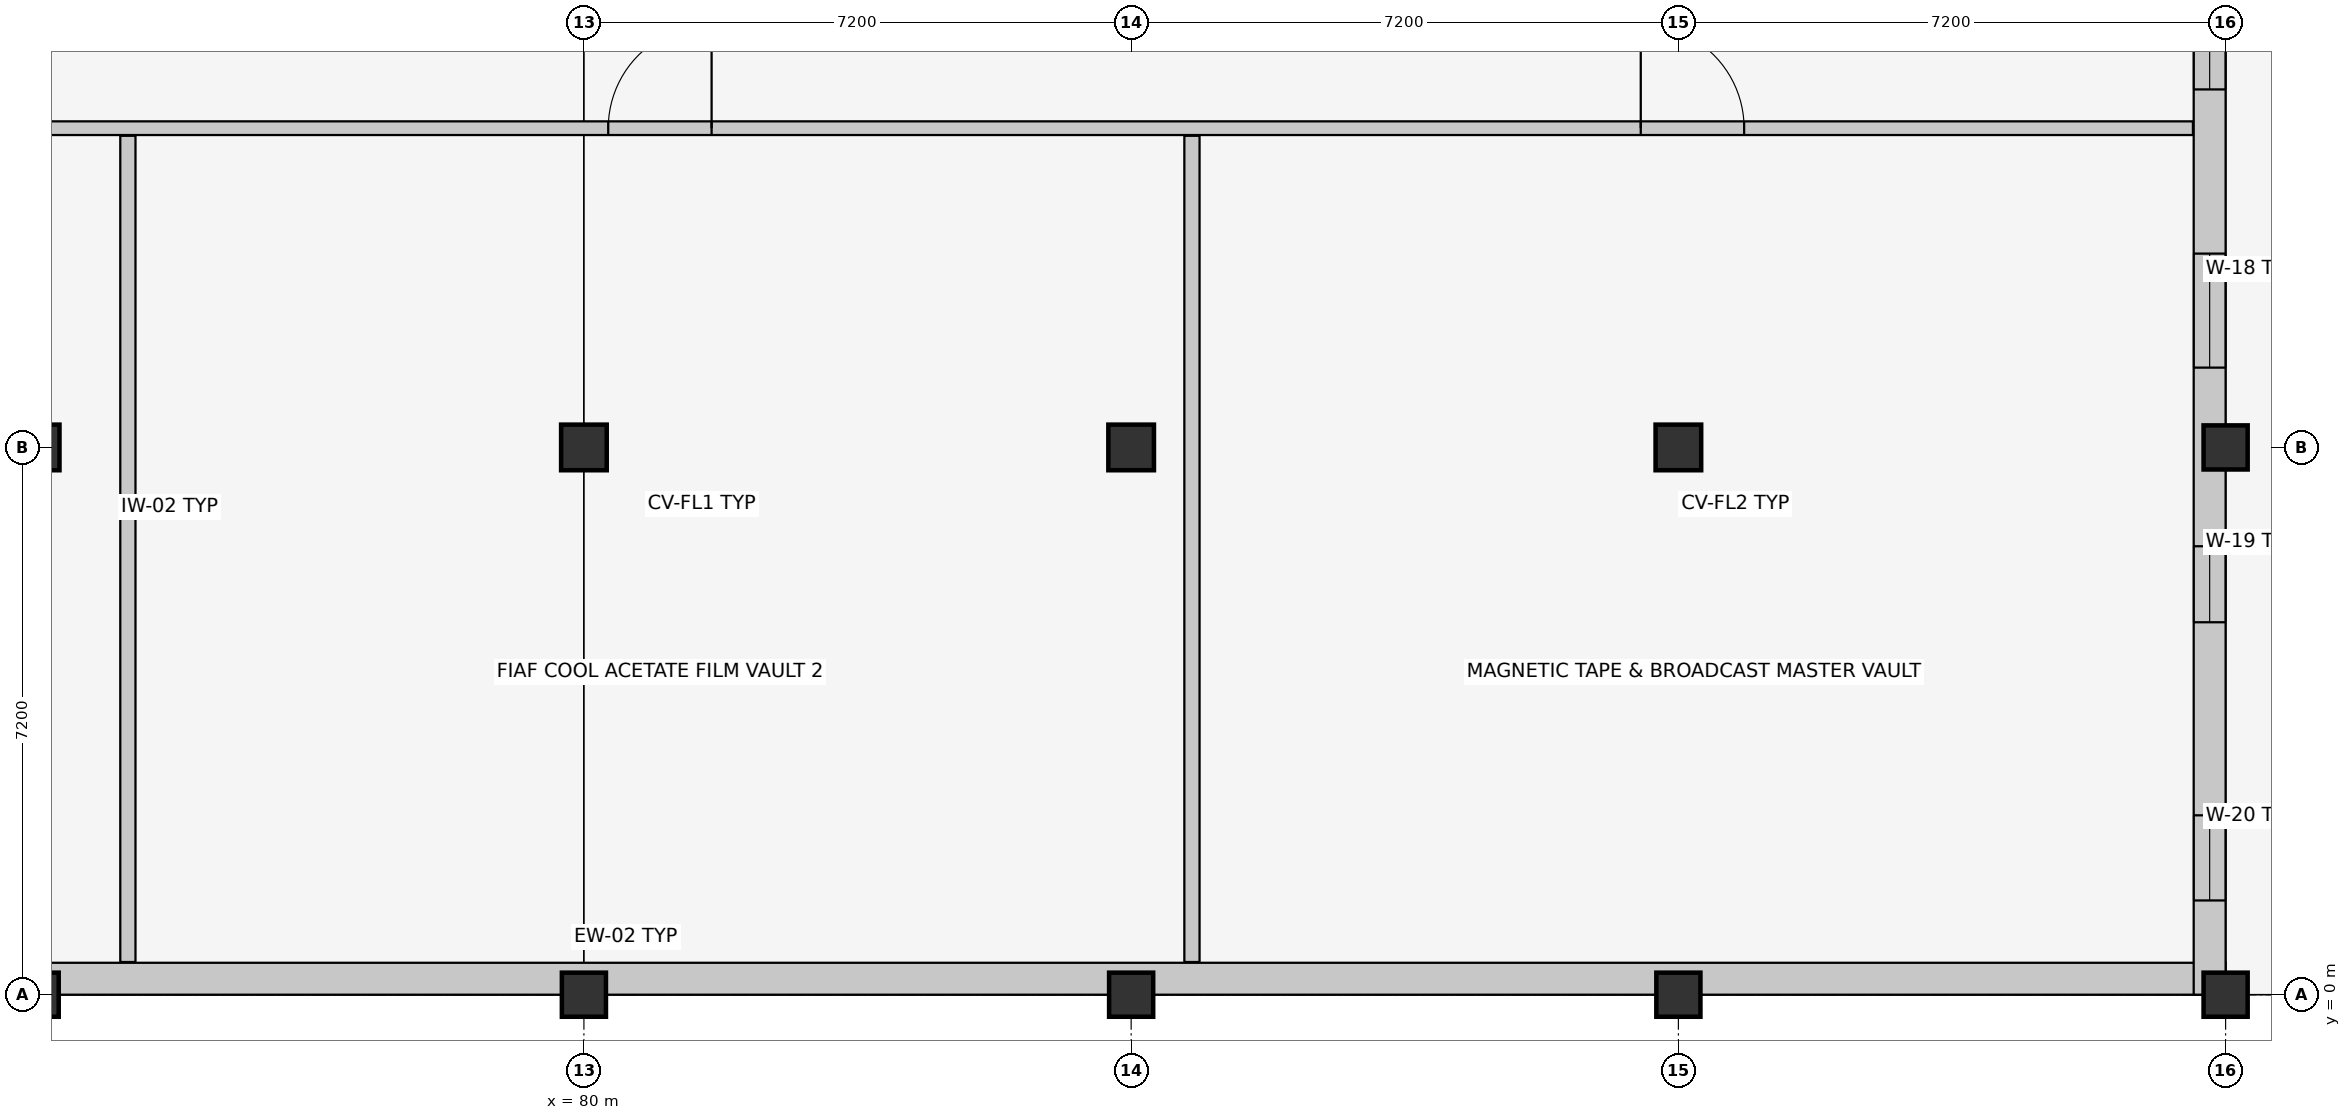
"""IFC4 building model, lengths in metres.
Left out: names, types, materials, properties, quantities, classifications, styles, units other than length and angle.
Written with IfcOpenShell. Run it as: python <this file> out.ifc"""

import sys

from ifc_helpers import new_model, si_unit, direction, frame, frame_2d, origin, origin_2d, place, context, subcontext, project, spatial, rectangle, extrude, element, fill, save


model = new_model("IFC4")
c1 = context("Model", 3, precision=1e-05, world=origin(), true_north=direction((0.0, 1.0)))
c2 = subcontext(c1, "Body", "Model", "MODEL_VIEW")
j1 = project(units=[si_unit("LENGTHUNIT", "METRE"), si_unit("PLANEANGLEUNIT", "RADIAN")], contexts=[c1])
p1 = place(None, origin())
s1 = spatial("IfcSite", under=j1, at=p1, CompositionType="ELEMENT")
p2 = place(p1, origin())
s2 = spatial("IfcBuilding", under=s1, at=p2, CompositionType="ELEMENT")
p3 = place(p2, frame((0.0, 0.0, 9.6)))
s3 = spatial("IfcBuildingStorey", under=s2, at=p3, CompositionType="ELEMENT", Elevation=9.6)
p4 = place(p3, frame((72.8, 0.0, 0.0), z_axis=(0.0, 0.0, 1.0), x_axis=(1.0, 0.0, 0.0)))
e1 = element("IfcColumn", 1, at=p4, inside=s3, PredefinedType="COLUMN", context=c2, shape_type="SweptSolid", body=[
    extrude(rectangle(XDim=0.58, YDim=0.58, at=origin_2d()), origin(), (0.0, 0.0, 1.0), 4.2),
])
p5 = place(p3, frame((72.8, 7.2, 0.0), z_axis=(0.0, 0.0, 1.0), x_axis=(1.0, 0.0, 0.0)))
e2 = element("IfcColumn", 2, at=p5, inside=s3, PredefinedType="COLUMN", context=c2, shape_type="SweptSolid", body=[
    extrude(rectangle(XDim=0.6, YDim=0.6, at=origin_2d()), origin(), (0.0, 0.0, 1.0), 4.2),
])
p6 = place(p3, frame((80.0, 0.0, 0.0), z_axis=(0.0, 0.0, 1.0), x_axis=(1.0, 0.0, 0.0)))
e3 = element("IfcColumn", 3, at=p6, inside=s3, PredefinedType="COLUMN", context=c2, shape_type="SweptSolid", body=[
    extrude(rectangle(XDim=0.58, YDim=0.58, at=origin_2d()), origin(), (0.0, 0.0, 1.0), 4.2),
])
p7 = place(p3, frame((80.0, 7.2, 0.0), z_axis=(0.0, 0.0, 1.0), x_axis=(1.0, 0.0, 0.0)))
e4 = element("IfcColumn", 4, at=p7, inside=s3, PredefinedType="COLUMN", context=c2, shape_type="SweptSolid", body=[
    extrude(rectangle(XDim=0.6, YDim=0.6, at=origin_2d()), origin(), (0.0, 0.0, 1.0), 4.2),
])
p8 = place(p3, frame((87.2, 0.0, 0.0), z_axis=(0.0, 0.0, 1.0), x_axis=(1.0, 0.0, 0.0)))
e5 = element("IfcColumn", 5, at=p8, inside=s3, PredefinedType="COLUMN", context=c2, shape_type="SweptSolid", body=[
    extrude(rectangle(XDim=0.58, YDim=0.58, at=origin_2d()), origin(), (0.0, 0.0, 1.0), 4.2),
])
p9 = place(p3, frame((87.2, 7.2, 0.0), z_axis=(0.0, 0.0, 1.0), x_axis=(1.0, 0.0, 0.0)))
e6 = element("IfcColumn", 6, at=p9, inside=s3, PredefinedType="COLUMN", context=c2, shape_type="SweptSolid", body=[
    extrude(rectangle(XDim=0.6, YDim=0.6, at=origin_2d()), origin(), (0.0, 0.0, 1.0), 4.2),
])
p10 = place(p3, frame((94.4, 0.0, 0.0), z_axis=(0.0, 0.0, 1.0), x_axis=(1.0, 0.0, 0.0)))
e7 = element("IfcColumn", 7, at=p10, inside=s3, PredefinedType="COLUMN", context=c2, shape_type="SweptSolid", body=[
    extrude(rectangle(XDim=0.58, YDim=0.58, at=origin_2d()), origin(), (0.0, 0.0, 1.0), 4.2),
])
p11 = place(p3, frame((94.4, 7.2, 0.0), z_axis=(0.0, 0.0, 1.0), x_axis=(1.0, 0.0, 0.0)))
e8 = element("IfcColumn", 8, at=p11, inside=s3, PredefinedType="COLUMN", context=c2, shape_type="SweptSolid", body=[
    extrude(rectangle(XDim=0.6, YDim=0.6, at=origin_2d()), origin(), (0.0, 0.0, 1.0), 4.2),
])
for number, where, z_axis, x_axis in (
    (9, (101.6, 0.0, 0.0), (0.0, 0.0, 1.0), (1.0, 0.0, 0.0)),
    (10, (101.6, 7.2, 0.0), (0.0, 0.0, 1.0), (1.0, 0.0, 0.0)),
):
    element("IfcColumn", number, at=place(p3, frame(where, z_axis=z_axis, x_axis=x_axis)), inside=s3, PredefinedType="COLUMN", context=c2, shape_type="SweptSolid", body=[
        extrude(rectangle(XDim=0.58, YDim=0.58, at=origin_2d()), origin(), (0.0, 0.0, 1.0), 4.2),
    ])
p12 = place(p3, frame((101.6, 0.21, 0.0), z_axis=(0.0, 0.0, 1.0), x_axis=(-1.0, 0.0, 0.0)))
e11 = element("IfcWall", 11, at=p12, inside=s3, PredefinedType="SOLIDWALL", context=c2, shape_type="SweptSolid", body=[
    extrude(rectangle(XDim=43.2, YDim=0.42, at=frame_2d((21.6, 0.0))), origin(), (0.0, 0.0, 1.0), 3.255),
])
p13 = place(p3, frame((101.39, 21.6, 0.0), z_axis=(0.0, 0.0, 1.0), x_axis=(0.0, -1.0, 0.0)))
e12 = element("IfcWall", 12, at=p13, inside=s3, PredefinedType="SOLIDWALL", context=c2, shape_type="SweptSolid", body=[
    extrude(rectangle(XDim=21.6, YDim=0.42, at=frame_2d((10.8, 0.0))), origin(), (0.0, 0.0, 1.0), 3.355),
])
p14 = place(p13, frame((1.225, 0.0, 0.9)))
e13 = element("IfcOpeningElement", 13, at=p14, cuts=e12, PredefinedType="OPENING", context=c2, shape_type="SweptSolid", body=[
    extrude(rectangle(XDim=1.15, YDim=1.6, at=frame_2d((0.575, 0.8))), frame((0.0, 0.222, 0.0), z_axis=(0.0, -1.0, 0.0), x_axis=(1.0, 0.0, 0.0)), (0.0, 0.0, 1.0), 0.444),
])
p15 = place(p13, frame((4.775, 0.0, 0.9)))
e14 = element("IfcOpeningElement", 14, at=p15, cuts=e12, PredefinedType="OPENING", context=c2, shape_type="SweptSolid", body=[
    extrude(rectangle(XDim=1.25, YDim=1.6, at=frame_2d((0.625, 0.8))), frame((0.0, 0.222, 0.0), z_axis=(0.0, -1.0, 0.0), x_axis=(1.0, 0.0, 0.0)), (0.0, 0.0, 1.0), 0.444),
])
p16 = place(p13, frame((8.31, 0.0, 0.9)))
e15 = element("IfcOpeningElement", 15, at=p16, cuts=e12, PredefinedType="OPENING", context=c2, shape_type="SweptSolid", body=[
    extrude(rectangle(XDim=1.38, YDim=1.6, at=frame_2d((0.69, 0.8))), frame((0.0, 0.222, 0.0), z_axis=(0.0, -1.0, 0.0), x_axis=(1.0, 0.0, 0.0)), (0.0, 0.0, 1.0), 0.444),
])
p17 = place(p13, frame((11.85, 0.0, 0.9)))
e16 = element("IfcOpeningElement", 16, at=p17, cuts=e12, PredefinedType="OPENING", context=c2, shape_type="SweptSolid", body=[
    extrude(rectangle(XDim=1.5, YDim=1.6, at=frame_2d((0.75, 0.8))), frame((0.0, 0.222, 0.0), z_axis=(0.0, -1.0, 0.0), x_axis=(1.0, 0.0, 0.0)), (0.0, 0.0, 1.0), 0.444),
])
p18 = place(p13, frame((15.7, 0.0, 0.9)))
e17 = element("IfcOpeningElement", 17, at=p18, cuts=e12, PredefinedType="OPENING", context=c2, shape_type="SweptSolid", body=[
    extrude(rectangle(XDim=1.0, YDim=1.75, at=frame_2d((0.5, 0.875))), frame((0.0, 0.222, 0.0), z_axis=(0.0, -1.0, 0.0), x_axis=(1.0, 0.0, 0.0)), (0.0, 0.0, 1.0), 0.444),
])
p19 = place(p13, frame((19.24, 0.0, 0.9)))
e18 = element("IfcOpeningElement", 18, at=p19, cuts=e12, PredefinedType="OPENING", context=c2, shape_type="SweptSolid", body=[
    extrude(rectangle(XDim=1.12, YDim=1.75, at=frame_2d((0.56, 0.875))), frame((0.0, 0.222, 0.0), z_axis=(0.0, -1.0, 0.0), x_axis=(1.0, 0.0, 0.0)), (0.0, 0.0, 1.0), 0.444),
])
p20 = place(p3, frame((58.83, 11.4, 0.0), z_axis=(0.0, 0.0, 1.0), x_axis=(1.0, 0.0, 0.0)))
e19 = element("IfcWall", 19, at=p20, inside=s3, PredefinedType="PARTITIONING", context=c2, shape_type="SweptSolid", body=[
    extrude(rectangle(XDim=42.34, YDim=0.18, at=frame_2d((21.17, 0.0))), origin(), (0.0, 0.0, 1.0), 3.96),
])
p21 = place(p20, frame((6.905, 0.0, 0.0)))
e20 = element("IfcOpeningElement", 20, at=p21, cuts=e19, PredefinedType="OPENING", context=c2, shape_type="SweptSolid", body=[
    extrude(rectangle(XDim=1.36, YDim=2.2, at=frame_2d((0.68, 1.1))), frame((0.0, 0.102, 0.0), z_axis=(0.0, -1.0, 0.0), x_axis=(1.0, 0.0, 0.0)), (0.0, 0.0, 1.0), 0.204),
])
p22 = place(p20, frame((21.49, 0.0, 0.0)))
e21 = element("IfcOpeningElement", 21, at=p22, cuts=e19, PredefinedType="OPENING", context=c2, shape_type="SweptSolid", body=[
    extrude(rectangle(XDim=1.36, YDim=2.2, at=frame_2d((0.68, 1.1))), frame((0.0, 0.102, 0.0), z_axis=(0.0, -1.0, 0.0), x_axis=(1.0, 0.0, 0.0)), (0.0, 0.0, 1.0), 0.204),
])
p23 = place(p20, frame((35.075, 0.0, 0.0)))
e22 = element("IfcOpeningElement", 22, at=p23, cuts=e19, PredefinedType="OPENING", context=c2, shape_type="SweptSolid", body=[
    extrude(rectangle(XDim=1.36, YDim=2.2, at=frame_2d((0.68, 1.1))), frame((0.0, 0.102, 0.0), z_axis=(0.0, -1.0, 0.0), x_axis=(1.0, 0.0, 0.0)), (0.0, 0.0, 1.0), 0.204),
])
for number, where, z_axis, x_axis in (
    (23, (74.0, 0.43, 0.0), (0.0, 0.0, 1.0), (0.0, 1.0, 0.0)),
    (24, (88.0, 0.43, 0.0), (0.0, 0.0, 1.0), (0.0, 1.0, 0.0)),
):
    element("IfcWall", number, at=place(p3, frame(where, z_axis=z_axis, x_axis=x_axis)), inside=s3, PredefinedType="PARTITIONING", context=c2, shape_type="SweptSolid", body=[
        extrude(rectangle(XDim=10.87, YDim=0.2, at=frame_2d((5.435, 0.0))), origin(), (0.0, 0.0, 1.0), 3.96),
    ])
p24 = place(p16, origin())
e25 = element("IfcWindow", 25, at=p24, inside=s3, PartitioningType="SINGLE_PANEL", PredefinedType="WINDOW", context=c2, shape_type="SweptSolid", body=[
    extrude(rectangle(XDim=1.38, YDim=1.6, at=frame_2d((0.69, 0.8))), frame((0.0, 0.03, 0.0), z_axis=(0.0, -1.0, 0.0), x_axis=(1.0, 0.0, 0.0)), (0.0, 0.0, 1.0), 0.06),
])
fill(e15, e25)
p25 = place(p17, origin())
e26 = element("IfcWindow", 26, at=p25, inside=s3, PartitioningType="SINGLE_PANEL", PredefinedType="WINDOW", context=c2, shape_type="SweptSolid", body=[
    extrude(rectangle(XDim=1.5, YDim=1.6, at=frame_2d((0.75, 0.8))), frame((0.0, 0.03, 0.0), z_axis=(0.0, -1.0, 0.0), x_axis=(1.0, 0.0, 0.0)), (0.0, 0.0, 1.0), 0.06),
])
fill(e16, e26)
p26 = place(p18, origin())
e27 = element("IfcWindow", 27, at=p26, inside=s3, PartitioningType="SINGLE_PANEL", PredefinedType="WINDOW", context=c2, shape_type="SweptSolid", body=[
    extrude(rectangle(XDim=1.0, YDim=1.75, at=frame_2d((0.5, 0.875))), frame((0.0, 0.03, 0.0), z_axis=(0.0, -1.0, 0.0), x_axis=(1.0, 0.0, 0.0)), (0.0, 0.0, 1.0), 0.06),
])
fill(e17, e27)
p27 = place(p19, origin())
e28 = element("IfcWindow", 28, at=p27, inside=s3, PartitioningType="SINGLE_PANEL", PredefinedType="WINDOW", context=c2, shape_type="SweptSolid", body=[
    extrude(rectangle(XDim=1.12, YDim=1.75, at=frame_2d((0.56, 0.875))), frame((0.0, 0.03, 0.0), z_axis=(0.0, -1.0, 0.0), x_axis=(1.0, 0.0, 0.0)), (0.0, 0.0, 1.0), 0.06),
])
fill(e18, e28)
p28 = place(p22, origin())
e29 = element("IfcDoor", 29, at=p28, inside=s3, OperationType="SINGLE_SWING_RIGHT", PredefinedType="DOOR", context=c2, shape_type="SweptSolid", body=[
    extrude(rectangle(XDim=1.36, YDim=2.2, at=frame_2d((0.68, 1.1))), frame((0.0, 0.025, 0.0), z_axis=(0.0, -1.0, 0.0), x_axis=(1.0, 0.0, 0.0)), (0.0, 0.0, 1.0), 0.05),
])
fill(e21, e29)
p29 = place(p23, origin())
e30 = element("IfcDoor", 30, at=p29, inside=s3, OperationType="SINGLE_SWING_LEFT", PredefinedType="DOOR", context=c2, shape_type="SweptSolid", body=[
    extrude(rectangle(XDim=1.36, YDim=2.2, at=frame_2d((0.68, 1.1))), frame((0.0, 0.025, 0.0), z_axis=(0.0, -1.0, 0.0), x_axis=(1.0, 0.0, 0.0)), (0.0, 0.0, 1.0), 0.05),
])
fill(e22, e30)
save(model, sys.argv[1])
